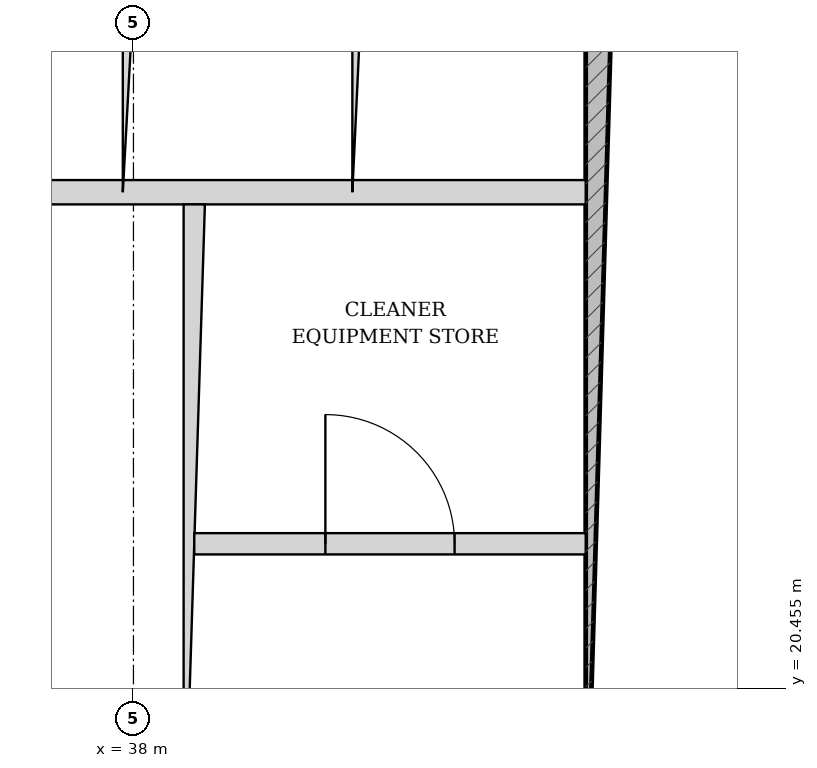
"""IFC4 building model, lengths in metres.
Left out: names, types, materials, properties, quantities, classifications, styles, units other than length and angle.
Written with IfcOpenShell. Run it as: python <this file> out.ifc"""

import sys

from ifc_helpers import new_model, si_unit, direction, frame, frame_2d, origin, place, context, subcontext, project, spatial, rectangle, extrude, source, transform, mapped, element, fill, save


model = new_model("IFC4")
c1 = context("Model", 3, precision=1e-05, world=origin(), true_north=direction((-0.2419218956, 0.970295726276)))
c2 = subcontext(c1, "Body", "Model", "MODEL_VIEW")
j1 = project(units=[si_unit("LENGTHUNIT", "METRE"), si_unit("PLANEANGLEUNIT", "RADIAN")], contexts=[c1])
p1 = place(None, origin())
s1 = spatial("IfcSite", under=j1, at=p1, CompositionType="ELEMENT")
p2 = place(p1, origin())
s2 = spatial("IfcBuilding", under=s1, at=p2, CompositionType="ELEMENT")
p3 = place(p2, frame((0.0, 0.0, 79.8)))
s3 = spatial("IfcBuildingStorey", under=s2, at=p3, CompositionType="ELEMENT", Elevation=79.8)
p4 = place(p3, frame((41.2, 19.175, 0.0), z_axis=(0.0, 0.0, 1.0), x_axis=(0.0, 1.0, 0.0)))
e1 = element("IfcWall", 1, at=p4, inside=s3, PredefinedType="SHEAR", context=c2, shape_type="SweptSolid", body=[
    extrude(rectangle(XDim=15.25, YDim=0.45, at=frame_2d((7.625, 0.0))), origin(), (0.0, 0.0, 1.0), 3.325),
])
p5 = place(p4, frame((7.8, 0.0, 0.0)))
e2 = element("IfcOpeningElement", 2, at=p5, cuts=e1, PredefinedType="OPENING", context=c2, shape_type="SweptSolid", body=[
    extrude(rectangle(XDim=1.05, YDim=2.15, at=frame_2d((0.525, 1.075))), frame((0.0, 0.235, 0.0), z_axis=(0.0, -1.0, 0.0), x_axis=(1.0, 0.0, 0.0)), (0.0, 0.0, 1.0), 0.47),
])
p6 = place(p3, frame((35.025, 23.72, 0.0), z_axis=(0.0, 0.0, 1.0), x_axis=(1.0, 0.0, 0.0)))
e3 = element("IfcWall", 3, at=p6, inside=s3, PredefinedType="PARTITIONING", context=c2, shape_type="SweptSolid", body=[
    extrude(rectangle(XDim=5.95, YDim=0.16, at=frame_2d((2.975, 0.0))), origin(), (0.0, 0.0, 1.0), 3.325),
])
p7 = place(p3, frame((38.0, 23.72, 0.0), z_axis=(0.0, 0.0, 1.0), x_axis=(0.0, 1.0, 0.0)))
e4 = element("IfcWall", 4, at=p7, inside=s3, PredefinedType="PARTITIONING", context=c2, shape_type="SweptSolid", body=[
    extrude(rectangle(XDim=2.56, YDim=0.14, at=frame_2d((1.28, 0.0))), origin(), (0.0, 0.0, 1.0), 3.325),
])
p8 = place(p3, frame((39.5, 23.72, 0.0), z_axis=(0.0, 0.0, 1.0), x_axis=(0.0, 1.0, 0.0)))
e5 = element("IfcWall", 5, at=p8, inside=s3, PredefinedType="PARTITIONING", context=c2, shape_type="SweptSolid", body=[
    extrude(rectangle(XDim=2.56, YDim=0.12, at=frame_2d((1.28, 0.0))), origin(), (0.0, 0.0, 1.0), 3.325),
])
p9 = place(p3, frame((38.4, 19.175, 0.0), z_axis=(0.0, 0.0, 1.0), x_axis=(0.0, 1.0, 0.0)))
e6 = element("IfcWall", 6, at=p9, inside=s3, PredefinedType="PARTITIONING", context=c2, shape_type="SweptSolid", body=[
    extrude(rectangle(XDim=4.465, YDim=0.14, at=frame_2d((2.232, 0.0))), origin(), (0.0, 0.0, 1.0), 3.325),
])
p10 = place(p3, frame((38.4, 21.407, 0.0), z_axis=(0.0, 0.0, 1.0), x_axis=(1.0, 0.0, 0.0)))
e7 = element("IfcWall", 7, at=p10, inside=s3, PredefinedType="PARTITIONING", context=c2, shape_type="SweptSolid", body=[
    extrude(rectangle(XDim=2.575, YDim=0.14, at=frame_2d((1.288, 0.0))), origin(), (0.0, 0.0, 1.0), 3.325),
])
p11 = place(p10, frame((0.863, 0.0, 0.0)))
e8 = element("IfcOpeningElement", 8, at=p11, cuts=e7, PredefinedType="OPENING", context=c2, shape_type="SweptSolid", body=[
    extrude(rectangle(XDim=0.85, YDim=2.1, at=frame_2d((0.425, 1.05))), frame((0.0, 0.08, 0.0), z_axis=(0.0, -1.0, 0.0), x_axis=(1.0, 0.0, 0.0)), (0.0, 0.0, 1.0), 0.16),
])
m1 = source(origin(), c2, "Body", "SweptSolid", [
    extrude(rectangle(XDim=0.85, YDim=2.1, at=frame_2d((0.425, 1.05))), frame((0.0, 0.025, 0.0), z_axis=(0.0, -1.0, 0.0), x_axis=(1.0, 0.0, 0.0)), (0.0, 0.0, 1.0), 0.05),
])
p12 = place(p11, origin())
e9 = element("IfcDoor", 9, at=p12, inside=s3, OperationType="SINGLE_SWING_LEFT", PredefinedType="DOOR", context=c2, shape_type="MappedRepresentation", body=[
    mapped(m1, transform((0.0, 0.0, 0.0), scale=1.0)),
])
fill(e8, e9)
save(model, sys.argv[1])
